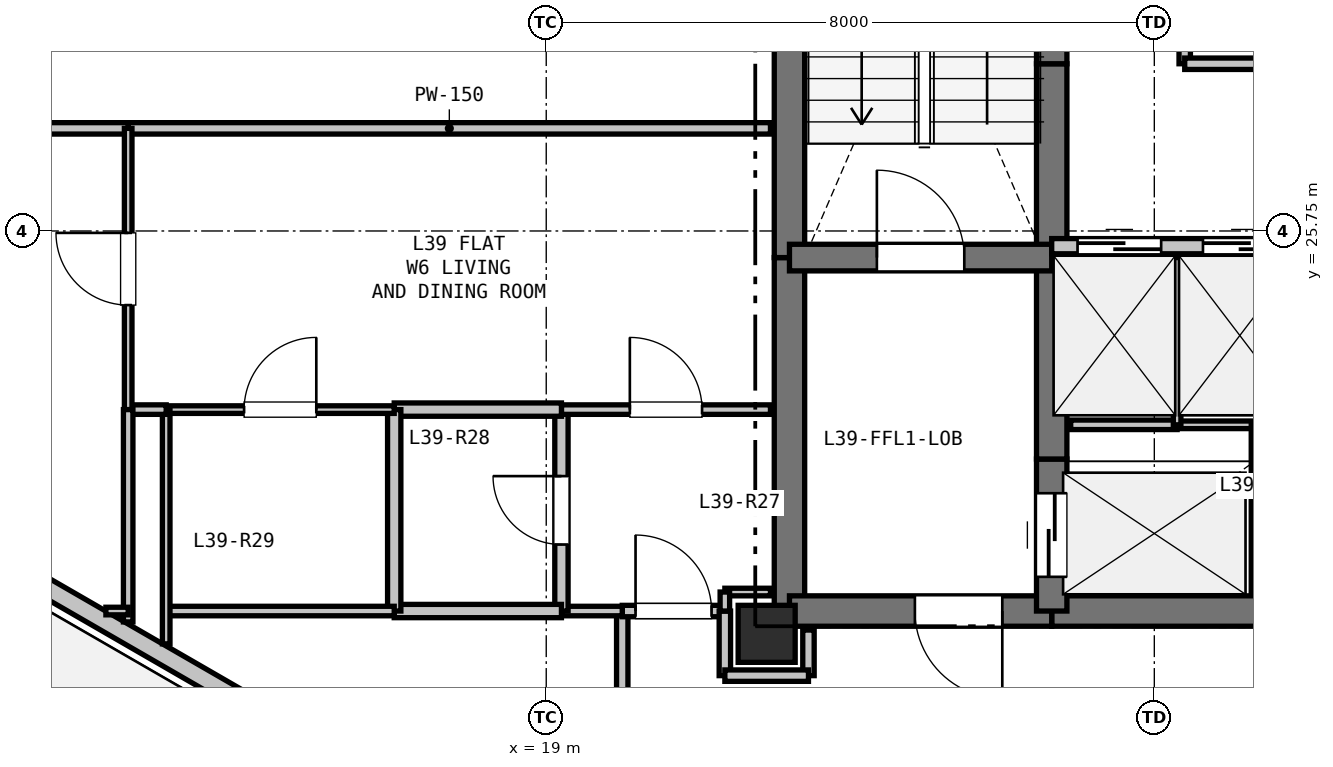
"""IFC4 building model, lengths in metres.
Left out: names, types, materials, properties, quantities, classifications, styles, units other than length and angle.
Written with IfcOpenShell. Run it as: python <this file> out.ifc"""

import sys

from ifc_helpers import new_model, si_unit, direction, frame, frame_2d, origin, origin_2d, place, context, subcontext, project, spatial, rectangle, extrude, element, fill, save


model = new_model("IFC4")
c1 = context("Model", 3, precision=1e-05, world=origin(), true_north=direction((0.0, 1.0)))
c2 = subcontext(c1, "Body", "Model", "MODEL_VIEW")
j1 = project(units=[si_unit("LENGTHUNIT", "METRE"), si_unit("PLANEANGLEUNIT", "RADIAN")], contexts=[c1])
p1 = place(None, origin())
s1 = spatial("IfcSite", under=j1, at=p1, CompositionType="ELEMENT")
p2 = place(p1, origin())
s2 = spatial("IfcBuilding", under=s1, at=p2, CompositionType="ELEMENT")
p3 = place(p2, frame((0.0, 0.0, 141.0)))
s3 = spatial("IfcBuildingStorey", under=s2, at=p3, CompositionType="ELEMENT", Elevation=141.0)
p4 = place(p3, frame((21.9, 20.45, 0.0), z_axis=(0.0, 0.0, 1.0), x_axis=(1.0, 0.0, 0.0)))
e1 = element("IfcColumn", 1, at=p4, inside=s3, PredefinedType="COLUMN", context=c2, shape_type="SweptSolid", body=[
    extrude(rectangle(XDim=0.75, YDim=0.75, at=origin_2d()), origin(), (0.0, 0.0, 1.0), 3.3),
])
p5 = place(p3, frame((16.378, 18.773, 0.0), z_axis=(0.0, 0.0, 1.0), x_axis=(-0.866027848477, 0.499995765644, 0.0)))
e2 = element("IfcWall", 2, at=p5, inside=s3, PredefinedType="SOLIDWALL", context=c2, shape_type="SweptSolid", body=[
    extrude(rectangle(XDim=11.186, YDim=0.25, at=frame_2d((5.593, 0.0))), origin(), (0.0, 0.0, 1.0), 2.68),
])
p6 = place(p5, frame((6.757, 0.0, 0.9)))
e3 = element("IfcOpeningElement", 3, at=p6, cuts=e2, PredefinedType="OPENING", context=c2, shape_type="SweptSolid", body=[
    extrude(rectangle(XDim=1.2, YDim=1.4, at=frame_2d((0.6, 0.7))), frame((0.0, 0.135, 0.0), z_axis=(0.0, -1.0, 0.0), x_axis=(1.0, 0.0, 0.0)), (0.0, 0.0, 1.0), 0.27),
])
p7 = place(p3, frame((22.2, 20.75, 0.0), z_axis=(0.0, 0.0, 1.0), x_axis=(0.0, 1.0, 0.0)))
e4 = element("IfcWall", 4, at=p7, inside=s3, PredefinedType="SHEAR", context=c2, shape_type="SweptSolid", body=[
    extrude(rectangle(XDim=4.65, YDim=0.4, at=frame_2d((2.325, 0.0))), origin(), (0.0, 0.0, 1.0), 3.06),
])
p8 = place(p3, frame((22.2, 25.4, 0.0), z_axis=(0.0, 0.0, 1.0), x_axis=(0.0, 1.0, 0.0)))
e5 = element("IfcWall", 5, at=p8, inside=s3, PredefinedType="SHEAR", context=c2, shape_type="SweptSolid", body=[
    extrude(rectangle(XDim=7.35, YDim=0.4, at=frame_2d((3.675, 0.0))), origin(), (0.0, 0.0, 1.0), 3.06),
])
p9 = place(p3, frame((28.35, 20.75, 0.0), z_axis=(0.0, 0.0, 1.0), x_axis=(-1.0, 0.0, 0.0)))
e6 = element("IfcWall", 6, at=p9, inside=s3, PredefinedType="SHEAR", context=c2, shape_type="SweptSolid", body=[
    extrude(rectangle(XDim=2.7, YDim=0.4, at=frame_2d((1.35, 0.0))), origin(), (0.0, 0.0, 1.0), 3.06),
])
p10 = place(p3, frame((25.65, 20.75, 0.0), z_axis=(0.0, 0.0, 1.0), x_axis=(-1.0, 0.0, 0.0)))
e7 = element("IfcWall", 7, at=p10, inside=s3, PredefinedType="SHEAR", context=c2, shape_type="SweptSolid", body=[
    extrude(rectangle(XDim=3.45, YDim=0.4, at=frame_2d((1.725, 0.0))), origin(), (0.0, 0.0, 1.0), 3.06),
])
p11 = place(p10, frame((0.65, 0.0, 0.0)))
e8 = element("IfcOpeningElement", 8, at=p11, cuts=e7, PredefinedType="OPENING", context=c2, shape_type="SweptSolid", body=[
    extrude(rectangle(XDim=1.15, YDim=2.15, at=frame_2d((0.575, 1.075))), frame((0.0, 0.21, 0.0), z_axis=(0.0, -1.0, 0.0), x_axis=(1.0, 0.0, 0.0)), (0.0, 0.0, 1.0), 0.42),
])
p12 = place(p3, frame((25.65, 20.75, 0.0), z_axis=(0.0, 0.0, 1.0), x_axis=(0.0, 1.0, 0.0)))
e9 = element("IfcWall", 9, at=p12, inside=s3, PredefinedType="SHEAR", context=c2, shape_type="SweptSolid", body=[
    extrude(rectangle(XDim=2.0, YDim=0.4, at=frame_2d((1.0, 0.0))), origin(), (0.0, 0.0, 1.0), 3.06),
])
p13 = place(p12, frame((0.45, 0.0, 0.0)))
e10 = element("IfcOpeningElement", 10, at=p13, cuts=e9, PredefinedType="OPENING", context=c2, shape_type="SweptSolid", body=[
    extrude(rectangle(XDim=1.1, YDim=2.15, at=frame_2d((0.55, 1.075))), frame((0.0, 0.21, 0.0), z_axis=(0.0, -1.0, 0.0), x_axis=(1.0, 0.0, 0.0)), (0.0, 0.0, 1.0), 0.42),
])
p14 = place(p3, frame((25.65, 22.75, 0.0), z_axis=(0.0, 0.0, 1.0), x_axis=(0.0, 1.0, 0.0)))
e11 = element("IfcWall", 11, at=p14, inside=s3, PredefinedType="SHEAR", context=c2, shape_type="SweptSolid", body=[
    extrude(rectangle(XDim=2.8, YDim=0.4, at=frame_2d((1.4, 0.0))), origin(), (0.0, 0.0, 1.0), 3.06),
])
p15 = place(p3, frame((25.65, 25.55, 0.0), z_axis=(0.0, 0.0, 1.0), x_axis=(0.0, 1.0, 0.0)))
e12 = element("IfcWall", 12, at=p15, inside=s3, PredefinedType="SHEAR", context=c2, shape_type="SweptSolid", body=[
    extrude(rectangle(XDim=2.4, YDim=0.4, at=frame_2d((1.2, 0.0))), origin(), (0.0, 0.0, 1.0), 3.06),
])
p16 = place(p3, frame((25.65, 27.95, 0.0), z_axis=(0.0, 0.0, 1.0), x_axis=(0.0, 1.0, 0.0)))
e13 = element("IfcWall", 13, at=p16, inside=s3, PredefinedType="SHEAR", context=c2, shape_type="SweptSolid", body=[
    extrude(rectangle(XDim=4.8, YDim=0.4, at=frame_2d((2.4, 0.0))), origin(), (0.0, 0.0, 1.0), 3.06),
])
p17 = place(p3, frame((22.2, 25.4, 0.0), z_axis=(0.0, 0.0, 1.0), x_axis=(1.0, 0.0, 0.0)))
e14 = element("IfcWall", 14, at=p17, inside=s3, PredefinedType="SHEAR", context=c2, shape_type="SweptSolid", body=[
    extrude(rectangle(XDim=3.45, YDim=0.35, at=frame_2d((1.725, 0.0))), origin(), (0.0, 0.0, 1.0), 3.06),
])
p18 = place(p17, frame((1.15, 0.0, 0.0)))
e15 = element("IfcOpeningElement", 15, at=p18, cuts=e14, PredefinedType="OPENING", context=c2, shape_type="SweptSolid", body=[
    extrude(rectangle(XDim=1.15, YDim=2.15, at=frame_2d((0.575, 1.075))), frame((0.0, 0.185, 0.0), z_axis=(0.0, -1.0, 0.0), x_axis=(1.0, 0.0, 0.0)), (0.0, 0.0, 1.0), 0.37),
])
p19 = place(p3, frame((25.65, 25.55, 0.0), z_axis=(0.0, 0.0, 1.0), x_axis=(1.0, 0.0, 0.0)))
e16 = element("IfcWall", 16, at=p19, inside=s3, PredefinedType="PARTITIONING", context=c2, shape_type="SweptSolid", body=[
    extrude(rectangle(XDim=4.95, YDim=0.2, at=frame_2d((2.475, 0.0))), origin(), (0.0, 0.0, 1.0), 3.06),
])
p20 = place(p19, frame((0.34, 0.0, 0.0)))
e17 = element("IfcOpeningElement", 17, at=p20, cuts=e16, PredefinedType="OPENING", context=c2, shape_type="SweptSolid", body=[
    extrude(rectangle(XDim=1.1, YDim=2.15, at=frame_2d((0.55, 1.075))), frame((0.0, 0.11, 0.0), z_axis=(0.0, -1.0, 0.0), x_axis=(1.0, 0.0, 0.0)), (0.0, 0.0, 1.0), 0.22),
])
p21 = place(p19, frame((1.99, 0.0, 0.0)))
e18 = element("IfcOpeningElement", 18, at=p21, cuts=e16, PredefinedType="OPENING", context=c2, shape_type="SweptSolid", body=[
    extrude(rectangle(XDim=1.1, YDim=2.15, at=frame_2d((0.55, 1.075))), frame((0.0, 0.11, 0.0), z_axis=(0.0, -1.0, 0.0), x_axis=(1.0, 0.0, 0.0)), (0.0, 0.0, 1.0), 0.22),
])
p22 = place(p19, frame((3.64, 0.0, 0.0)))
e19 = element("IfcOpeningElement", 19, at=p22, cuts=e16, PredefinedType="OPENING", context=c2, shape_type="SweptSolid", body=[
    extrude(rectangle(XDim=1.1, YDim=2.15, at=frame_2d((0.55, 1.075))), frame((0.0, 0.11, 0.0), z_axis=(0.0, -1.0, 0.0), x_axis=(1.0, 0.0, 0.0)), (0.0, 0.0, 1.0), 0.22),
])
p23 = place(p3, frame((25.9, 23.2, 0.0), z_axis=(0.0, 0.0, 1.0), x_axis=(1.0, 0.0, 0.0)))
e20 = element("IfcWall", 20, at=p23, inside=s3, PredefinedType="PARTITIONING", context=c2, shape_type="SweptSolid", body=[
    extrude(rectangle(XDim=1.4, YDim=0.125, at=frame_2d((0.7, 0.0))), origin(), (0.0, 0.0, 1.0), 3.06),
])
p24 = place(p3, frame((27.3, 23.2, 0.0), z_axis=(0.0, 0.0, 1.0), x_axis=(1.0, 0.0, 0.0)))
e21 = element("IfcWall", 21, at=p24, inside=s3, PredefinedType="PARTITIONING", context=c2, shape_type="SweptSolid", body=[
    extrude(rectangle(XDim=1.05, YDim=0.1, at=frame_2d((0.525, 0.0))), origin(), (0.0, 0.0, 1.0), 3.06),
])
p25 = place(p3, frame((28.35, 23.2, 0.0), z_axis=(0.0, 0.0, 1.0), x_axis=(0.0, -1.0, 0.0)))
e22 = element("IfcWall", 22, at=p25, inside=s3, PredefinedType="PARTITIONING", context=c2, shape_type="SweptSolid", body=[
    extrude(rectangle(XDim=2.2, YDim=0.15, at=frame_2d((1.1, 0.0))), origin(), (0.0, 0.0, 1.0), 3.06),
])
p26 = place(p3, frame((27.3, 25.4, 0.0), z_axis=(0.0, 0.0, 1.0), x_axis=(0.0, -1.0, 0.0)))
e23 = element("IfcWall", 23, at=p26, inside=s3, PredefinedType="PARTITIONING", context=c2, shape_type="SweptSolid", body=[
    extrude(rectangle(XDim=2.2, YDim=0.1, at=frame_2d((1.1, 0.0))), origin(), (0.0, 0.0, 1.0), 3.06),
])
p27 = place(p3, frame((27.4, 29.25, 0.0), z_axis=(0.0, 0.0, 1.0), x_axis=(0.0, -1.0, 0.0)))
e24 = element("IfcWall", 24, at=p27, inside=s3, PredefinedType="PARTITIONING", context=c2, shape_type="SweptSolid", body=[
    extrude(rectangle(XDim=1.3, YDim=0.15, at=frame_2d((0.65, 0.0))), origin(), (0.0, 0.0, 1.0), 3.06),
])
p28 = place(p3, frame((27.4, 27.95, 0.0), z_axis=(0.0, 0.0, 1.0), x_axis=(1.0, 0.0, 0.0)))
e25 = element("IfcWall", 25, at=p28, inside=s3, PredefinedType="PARTITIONING", context=c2, shape_type="SweptSolid", body=[
    extrude(rectangle(XDim=4.7, YDim=0.15, at=frame_2d((2.35, 0.0))), origin(), (0.0, 0.0, 1.0), 3.06),
])
p29 = place(p28, frame((1.85, 0.0, 0.0)))
e26 = element("IfcOpeningElement", 26, at=p29, cuts=e25, PredefinedType="OPENING", context=c2, shape_type="SweptSolid", body=[
    extrude(rectangle(XDim=1.0, YDim=2.15, at=frame_2d((0.5, 1.075))), frame((0.0, 0.085, 0.0), z_axis=(0.0, -1.0, 0.0), x_axis=(1.0, 0.0, 0.0)), (0.0, 0.0, 1.0), 0.17),
])
p30 = place(p3, frame((22.45, 19.9, 0.0), z_axis=(0.0, 0.0, 1.0), x_axis=(0.0, 1.0, 0.0)))
e27 = element("IfcWall", 27, at=p30, inside=s3, PredefinedType="PARTITIONING", context=c2, shape_type="SweptSolid", body=[
    extrude(rectangle(XDim=0.6, YDim=0.15, at=frame_2d((0.3, 0.0))), origin(), (0.0, 0.0, 1.0), 2.433),
])
p31 = place(p3, frame((20.0, 18.15, 0.0), z_axis=(0.0, 0.0, 1.0), x_axis=(0.0, 1.0, 0.0)))
e28 = element("IfcWall", 28, at=p31, inside=s3, PredefinedType="PARTITIONING", context=c2, shape_type="SweptSolid", body=[
    extrude(rectangle(XDim=2.6, YDim=0.15, at=frame_2d((1.3, 0.0))), origin(), (0.0, 0.0, 1.0), 3.06),
])
p32 = place(p3, frame((20.0, 20.75, 0.0), z_axis=(0.0, 0.0, 1.0), x_axis=(1.0, 0.0, 0.0)))
e29 = element("IfcWall", 29, at=p32, inside=s3, PredefinedType="PARTITIONING", context=c2, shape_type="SweptSolid", body=[
    extrude(rectangle(XDim=1.35, YDim=0.15, at=frame_2d((0.675, 0.0))), origin(), (0.0, 0.0, 1.0), 2.433),
])
p33 = place(p32, frame((0.175, 0.0, 0.0)))
e30 = element("IfcOpeningElement", 30, at=p33, cuts=e29, PredefinedType="OPENING", context=c2, shape_type="SweptSolid", body=[
    extrude(rectangle(XDim=1.0, YDim=2.15, at=frame_2d((0.5, 1.075))), frame((0.0, 0.085, 0.0), z_axis=(0.0, -1.0, 0.0), x_axis=(1.0, 0.0, 0.0)), (0.0, 0.0, 1.0), 0.17),
])
p34 = place(p3, frame((21.35, 20.75, 0.0), z_axis=(0.0, 0.0, 1.0), x_axis=(0.0, -1.0, 0.0)))
e31 = element("IfcWall", 31, at=p34, inside=s3, PredefinedType="PARTITIONING", context=c2, shape_type="SweptSolid", body=[
    extrude(rectangle(XDim=0.85, YDim=0.15, at=frame_2d((0.425, 0.0))), origin(), (0.0, 0.0, 1.0), 2.433),
])
p35 = place(p3, frame((21.35, 19.9, 0.0), z_axis=(0.0, 0.0, 1.0), x_axis=(1.0, 0.0, 0.0)))
e32 = element("IfcWall", 32, at=p35, inside=s3, PredefinedType="PARTITIONING", context=c2, shape_type="SweptSolid", body=[
    extrude(rectangle(XDim=1.1, YDim=0.15, at=frame_2d((0.55, 0.0))), origin(), (0.0, 0.0, 1.0), 2.433),
])
p36 = place(p3, frame((20.0, 20.75, 0.0), z_axis=(0.0, 0.0, 1.0), x_axis=(-1.0, 0.0, 0.0)))
e33 = element("IfcWall", 33, at=p36, inside=s3, PredefinedType="PARTITIONING", context=c2, shape_type="SweptSolid", body=[
    extrude(rectangle(XDim=0.8, YDim=0.125, at=frame_2d((0.4, 0.0))), origin(), (0.0, 0.0, 1.0), 3.06),
])
p37 = place(p3, frame((19.2, 20.75, 0.0), z_axis=(0.0, 0.0, 1.0), x_axis=(0.0, 1.0, 0.0)))
e34 = element("IfcWall", 34, at=p37, inside=s3, PredefinedType="PLUMBINGWALL", context=c2, shape_type="SweptSolid", body=[
    extrude(rectangle(XDim=2.65, YDim=0.175, at=frame_2d((1.325, 0.0))), origin(), (0.0, 0.0, 1.0), 2.433),
])
p38 = place(p37, frame((0.875, 0.0, 0.0)))
e35 = element("IfcOpeningElement", 35, at=p38, cuts=e34, PredefinedType="OPENING", context=c2, shape_type="SweptSolid", body=[
    extrude(rectangle(XDim=0.9, YDim=2.1, at=frame_2d((0.45, 1.05))), frame((0.0, 0.097, 0.0), z_axis=(0.0, -1.0, 0.0), x_axis=(1.0, 0.0, 0.0)), (0.0, 0.0, 1.0), 0.195),
])
p39 = place(p3, frame((19.2, 23.4, 0.0), z_axis=(0.0, 0.0, 1.0), x_axis=(1.0, 0.0, 0.0)))
e36 = element("IfcWall", 36, at=p39, inside=s3, PredefinedType="PARTITIONING", context=c2, shape_type="SweptSolid", body=[
    extrude(rectangle(XDim=2.75, YDim=0.125, at=frame_2d((1.375, 0.0))), origin(), (0.0, 0.0, 1.0), 2.585),
])
p40 = place(p39, frame((0.9, 0.0, 0.0)))
e37 = element("IfcOpeningElement", 37, at=p40, cuts=e36, PredefinedType="OPENING", context=c2, shape_type="SweptSolid", body=[
    extrude(rectangle(XDim=0.95, YDim=2.1, at=frame_2d((0.475, 1.05))), frame((0.0, 0.073, 0.0), z_axis=(0.0, -1.0, 0.0), x_axis=(1.0, 0.0, 0.0)), (0.0, 0.0, 1.0), 0.145),
])
p41 = place(p3, frame((21.95, 21.0, 0.0), z_axis=(0.0, 0.0, 1.0), x_axis=(-1.0, 0.0, 0.0)))
e38 = element("IfcWall", 38, at=p41, inside=s3, PredefinedType="PARTITIONING", context=c2, shape_type="SweptSolid", body=[
    extrude(rectangle(XDim=0.6, YDim=0.1, at=frame_2d((0.3, 0.0))), origin(), (0.0, 0.0, 1.0), 2.585),
])
p42 = place(p3, frame((21.35, 21.0, 0.0), z_axis=(0.0, 0.0, 1.0), x_axis=(0.0, -1.0, 0.0)))
e39 = element("IfcWall", 39, at=p42, inside=s3, PredefinedType="PARTITIONING", context=c2, shape_type="SweptSolid", body=[
    extrude(rectangle(XDim=0.25, YDim=0.125, at=frame_2d((0.125, 0.0))), origin(), (0.0, 0.0, 1.0), 3.06),
])
for number, where, z_axis, x_axis in (
    (40, (17.0, 23.4, 0.0), (0.0, 0.0, 1.0), (1.0, 0.0, 0.0)),
    (41, (19.2, 20.75, 0.0), (0.0, 0.0, 1.0), (-1.0, 0.0, 0.0)),
):
    element("IfcWall", number, at=place(p3, frame(where, z_axis=z_axis, x_axis=x_axis)), inside=s3, PredefinedType="PLUMBINGWALL", context=c2, shape_type="SweptSolid", body=[
        extrude(rectangle(XDim=2.2, YDim=0.175, at=frame_2d((1.1, 0.0))), origin(), (0.0, 0.0, 1.0), 3.06),
    ])
p43 = place(p3, frame((17.0, 20.75, 0.0), z_axis=(0.0, 0.0, 1.0), x_axis=(0.0, 1.0, 0.0)))
e42 = element("IfcWall", 42, at=p43, inside=s3, PredefinedType="PLUMBINGWALL", context=c2, shape_type="SweptSolid", body=[
    extrude(rectangle(XDim=2.65, YDim=0.175, at=frame_2d((1.325, 0.0))), origin(), (0.0, 0.0, 1.0), 2.433),
])
p44 = place(p3, frame((14.0, 23.4, 0.0), z_axis=(0.0, 0.0, 1.0), x_axis=(1.0, 0.0, 0.0)))
e43 = element("IfcWall", 43, at=p44, inside=s3, PredefinedType="PARTITIONING", context=c2, shape_type="SweptSolid", body=[
    extrude(rectangle(XDim=3.0, YDim=0.1, at=frame_2d((1.5, 0.0))), origin(), (0.0, 0.0, 1.0), 3.06),
])
p45 = place(p44, frame((1.025, 0.0, 0.0)))
e44 = element("IfcOpeningElement", 44, at=p45, cuts=e43, PredefinedType="OPENING", context=c2, shape_type="SweptSolid", body=[
    extrude(rectangle(XDim=0.95, YDim=2.1, at=frame_2d((0.475, 1.05))), frame((0.0, 0.06, 0.0), z_axis=(0.0, -1.0, 0.0), x_axis=(1.0, 0.0, 0.0)), (0.0, 0.0, 1.0), 0.12),
])
p46 = place(p3, frame((17.0, 20.75, 0.0), z_axis=(0.0, 0.0, 1.0), x_axis=(-1.0, 0.0, 0.0)))
e45 = element("IfcWall", 45, at=p46, inside=s3, PredefinedType="PARTITIONING", context=c2, shape_type="SweptSolid", body=[
    extrude(rectangle(XDim=3.0, YDim=0.125, at=frame_2d((1.5, 0.0))), origin(), (0.0, 0.0, 1.0), 2.365),
])
p47 = place(p3, frame((14.0, 20.318, 0.0), z_axis=(0.0, 0.0, 1.0), x_axis=(0.0, 1.0, 0.0)))
e46 = element("IfcWall", 46, at=p47, inside=s3, PredefinedType="PARTITIONING", context=c2, shape_type="SweptSolid", body=[
    extrude(rectangle(XDim=3.082, YDim=0.1, at=frame_2d((1.541, 0.0))), origin(), (0.0, 0.0, 1.0), 2.365),
])
p48 = place(p3, frame((21.95, 27.1, 0.0), z_axis=(0.0, 0.0, 1.0), x_axis=(-1.0, 0.0, 0.0)))
e47 = element("IfcWall", 47, at=p48, inside=s3, PredefinedType="PARTITIONING", context=c2, shape_type="SweptSolid", body=[
    extrude(rectangle(XDim=8.45, YDim=0.15, at=frame_2d((4.225, 0.0))), origin(), (0.0, 0.0, 1.0), 2.585),
])
p49 = place(p3, frame((13.5, 27.1, 0.0), z_axis=(0.0, 0.0, 1.0), x_axis=(-1.0, 0.0, 0.0)))
e48 = element("IfcWall", 48, at=p49, inside=s3, PredefinedType="PARTITIONING", context=c2, shape_type="SweptSolid", body=[
    extrude(rectangle(XDim=6.791, YDim=0.15, at=frame_2d((3.396, 0.0))), origin(), (0.0, 0.0, 1.0), 2.725),
])
p50 = place(p3, frame((14.0, 23.4, 0.0), z_axis=(0.0, 0.0, 1.0), x_axis=(-1.0, 0.0, 0.0)))
e49 = element("IfcWall", 49, at=p50, inside=s3, PredefinedType="PARTITIONING", context=c2, shape_type="SweptSolid", body=[
    extrude(rectangle(XDim=0.5, YDim=0.125, at=frame_2d((0.25, 0.0))), origin(), (0.0, 0.0, 1.0), 3.06),
])
p51 = place(p3, frame((13.5, 23.4, 0.0), z_axis=(0.0, 0.0, 1.0), x_axis=(0.0, 1.0, 0.0)))
e50 = element("IfcWall", 50, at=p51, inside=s3, PredefinedType="PARTITIONING", context=c2, shape_type="SweptSolid", body=[
    extrude(rectangle(XDim=3.7, YDim=0.1, at=frame_2d((1.85, 0.0))), origin(), (0.0, 0.0, 1.0), 3.06),
])
p52 = place(p51, frame((1.375, 0.0, 0.0)))
e51 = element("IfcOpeningElement", 51, at=p52, cuts=e50, PredefinedType="OPENING", context=c2, shape_type="SweptSolid", body=[
    extrude(rectangle(XDim=0.95, YDim=2.1, at=frame_2d((0.475, 1.05))), frame((0.0, 0.06, 0.0), z_axis=(0.0, -1.0, 0.0), x_axis=(1.0, 0.0, 0.0)), (0.0, 0.0, 1.0), 0.12),
])
p53 = place(p3, frame((13.5, 23.4, 0.0), z_axis=(0.0, 0.0, 1.0), x_axis=(0.0, -1.0, 0.0)))
e52 = element("IfcWall", 52, at=p53, inside=s3, PredefinedType="PARTITIONING", context=c2, shape_type="SweptSolid", body=[
    extrude(rectangle(XDim=2.793, YDim=0.125, at=frame_2d((1.396, 0.0))), origin(), (0.0, 0.0, 1.0), 2.365),
])
p54 = place(p3, frame((13.5, 20.75, 0.0), z_axis=(0.0, 0.0, 1.0), x_axis=(-1.0, 0.0, 0.0)))
e53 = element("IfcWall", 53, at=p54, inside=s3, PredefinedType="PARTITIONING", context=c2, shape_type="SweptSolid", body=[
    extrude(rectangle(XDim=0.293, YDim=0.1, at=frame_2d((0.146, 0.0))), origin(), (0.0, 0.0, 1.0), 3.06),
])
p55 = place(p20, origin())
e54 = element("IfcDoor", 54, at=p55, inside=s3, OperationType="SLIDING_TO_LEFT", PredefinedType="DOOR", context=c2, shape_type="SweptSolid", body=[
    extrude(rectangle(XDim=1.1, YDim=2.15, at=frame_2d((0.55, 1.075))), frame((0.0, 0.025, 0.0), z_axis=(0.0, -1.0, 0.0), x_axis=(1.0, 0.0, 0.0)), (0.0, 0.0, 1.0), 0.05),
])
fill(e17, e54)
p56 = place(p21, origin())
e55 = element("IfcDoor", 55, at=p56, inside=s3, OperationType="SLIDING_TO_LEFT", PredefinedType="DOOR", context=c2, shape_type="SweptSolid", body=[
    extrude(rectangle(XDim=1.1, YDim=2.15, at=frame_2d((0.55, 1.075))), frame((0.0, 0.025, 0.0), z_axis=(0.0, -1.0, 0.0), x_axis=(1.0, 0.0, 0.0)), (0.0, 0.0, 1.0), 0.05),
])
fill(e18, e55)
p57 = place(p13, origin())
e56 = element("IfcDoor", 56, at=p57, inside=s3, OperationType="SLIDING_TO_LEFT", PredefinedType="DOOR", context=c2, shape_type="SweptSolid", body=[
    extrude(rectangle(XDim=1.1, YDim=2.15, at=frame_2d((0.55, 1.075))), frame((0.0, 0.025, 0.0), z_axis=(0.0, -1.0, 0.0), x_axis=(1.0, 0.0, 0.0)), (0.0, 0.0, 1.0), 0.05),
])
fill(e10, e56)
p58 = place(p18, origin())
e57 = element("IfcDoor", 57, at=p58, inside=s3, OperationType="SINGLE_SWING_LEFT", PredefinedType="DOOR", context=c2, shape_type="SweptSolid", body=[
    extrude(rectangle(XDim=1.15, YDim=2.15, at=frame_2d((0.575, 1.075))), frame((0.0, 0.025, 0.0), z_axis=(0.0, -1.0, 0.0), x_axis=(1.0, 0.0, 0.0)), (0.0, 0.0, 1.0), 0.05),
])
fill(e15, e57)
p59 = place(p11, origin())
e58 = element("IfcDoor", 58, at=p59, inside=s3, OperationType="SINGLE_SWING_LEFT", PredefinedType="DOOR", context=c2, shape_type="SweptSolid", body=[
    extrude(rectangle(XDim=1.15, YDim=2.15, at=frame_2d((0.575, 1.075))), frame((0.0, 0.025, 0.0), z_axis=(0.0, -1.0, 0.0), x_axis=(1.0, 0.0, 0.0)), (0.0, 0.0, 1.0), 0.05),
])
fill(e8, e58)
p60 = place(p33, origin())
e59 = element("IfcDoor", 59, at=p60, inside=s3, OperationType="SINGLE_SWING_LEFT", PredefinedType="DOOR", context=c2, shape_type="SweptSolid", body=[
    extrude(rectangle(XDim=1.0, YDim=2.15, at=frame_2d((0.5, 1.075))), frame((0.0, 0.025, 0.0), z_axis=(0.0, -1.0, 0.0), x_axis=(1.0, 0.0, 0.0)), (0.0, 0.0, 1.0), 0.05),
])
fill(e30, e59)
p61 = place(p38, origin())
e60 = element("IfcDoor", 60, at=p61, inside=s3, OperationType="SINGLE_SWING_RIGHT", PredefinedType="DOOR", context=c2, shape_type="SweptSolid", body=[
    extrude(rectangle(XDim=0.9, YDim=2.1, at=frame_2d((0.45, 1.05))), frame((0.0, 0.025, 0.0), z_axis=(0.0, -1.0, 0.0), x_axis=(1.0, 0.0, 0.0)), (0.0, 0.0, 1.0), 0.05),
])
fill(e35, e60)
p62 = place(p40, origin())
e61 = element("IfcDoor", 61, at=p62, inside=s3, OperationType="SINGLE_SWING_LEFT", PredefinedType="DOOR", context=c2, shape_type="SweptSolid", body=[
    extrude(rectangle(XDim=0.95, YDim=2.1, at=frame_2d((0.475, 1.05))), frame((0.0, 0.025, 0.0), z_axis=(0.0, -1.0, 0.0), x_axis=(1.0, 0.0, 0.0)), (0.0, 0.0, 1.0), 0.05),
])
fill(e37, e61)
p63 = place(p45, origin())
e62 = element("IfcDoor", 62, at=p63, inside=s3, OperationType="SINGLE_SWING_RIGHT", PredefinedType="DOOR", context=c2, shape_type="SweptSolid", body=[
    extrude(rectangle(XDim=0.95, YDim=2.1, at=frame_2d((0.475, 1.05))), frame((0.0, 0.025, 0.0), z_axis=(0.0, -1.0, 0.0), x_axis=(1.0, 0.0, 0.0)), (0.0, 0.0, 1.0), 0.05),
])
fill(e44, e62)
p64 = place(p52, origin())
e63 = element("IfcDoor", 63, at=p64, inside=s3, OperationType="SINGLE_SWING_RIGHT", PredefinedType="DOOR", context=c2, shape_type="SweptSolid", body=[
    extrude(rectangle(XDim=0.95, YDim=2.1, at=frame_2d((0.475, 1.05))), frame((0.0, 0.025, 0.0), z_axis=(0.0, -1.0, 0.0), x_axis=(1.0, 0.0, 0.0)), (0.0, 0.0, 1.0), 0.05),
])
fill(e51, e63)
save(model, sys.argv[1])
